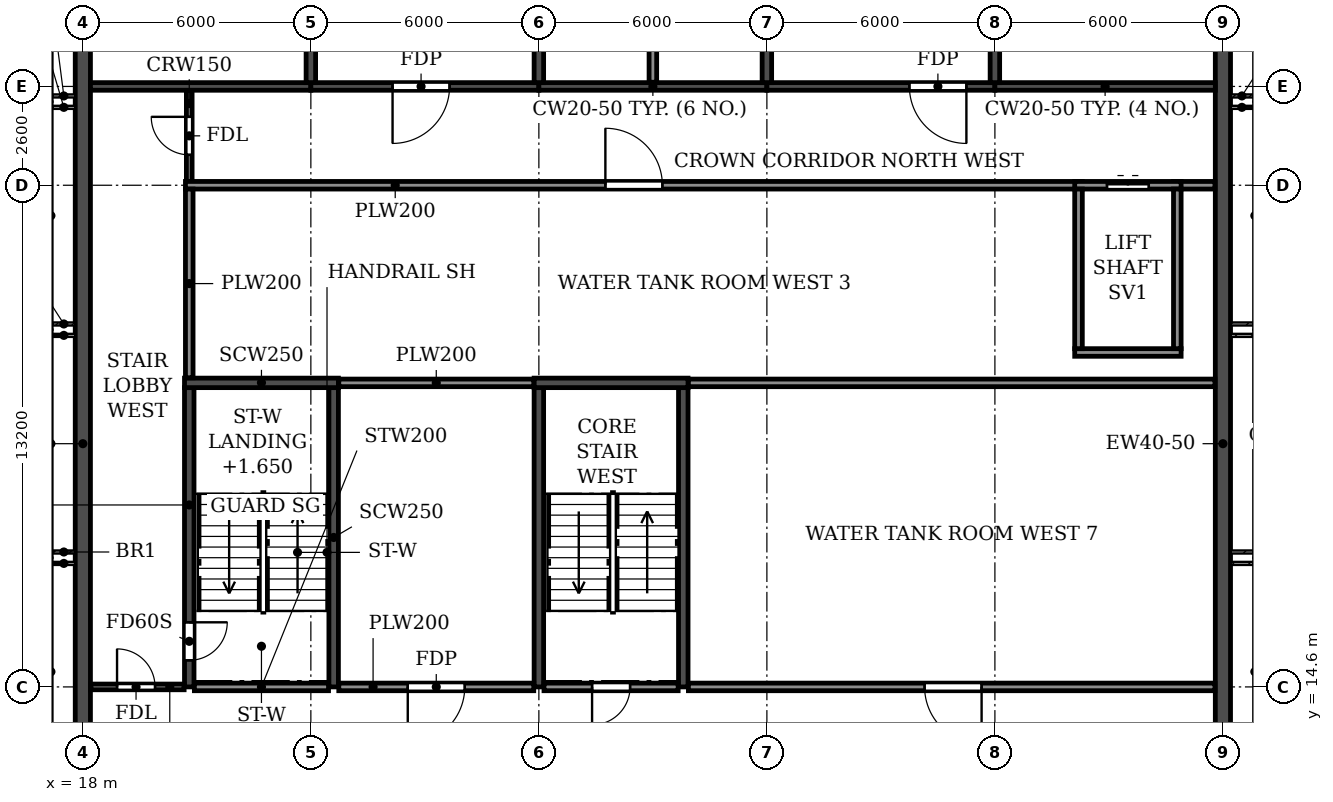
"""IFC4 building model, lengths in metres.
Left out: names, types, materials, properties, quantities, classifications, styles, units other than length and angle.
Written with IfcOpenShell. Run it as: python <this file> out.ifc"""

import sys

from ifc_helpers import new_model, si_unit, direction, frame, frame_2d, origin, place, context, subcontext, project, spatial, rectangle, extrude, element, fill, save


model = new_model("IFC4")
c1 = context("Model", 3, precision=1e-05, world=origin(), true_north=direction((0.0, 1.0)))
c2 = subcontext(c1, "Body", "Model", "MODEL_VIEW")
j1 = project(units=[si_unit("LENGTHUNIT", "METRE"), si_unit("PLANEANGLEUNIT", "RADIAN")], contexts=[c1])
p1 = place(None, origin())
s1 = spatial("IfcSite", under=j1, at=p1, CompositionType="ELEMENT")
p2 = place(p1, origin())
s2 = spatial("IfcBuilding", under=s1, at=p2, CompositionType="ELEMENT")
p3 = place(p2, frame((0.0, 0.0, 285.6)))
s3 = spatial("IfcBuildingStorey", under=s2, at=p3, CompositionType="ELEMENT", Elevation=285.6)
for number, where, z_axis, x_axis in (
    (1, (24.0, 30.5, 0.0), (0.0, 0.0, 1.0), (0.0, 1.0, 0.0)),
    (2, (30.0, 30.5, 0.0), (0.0, 0.0, 1.0), (0.0, 1.0, 0.0)),
    (3, (36.0, 30.5, 0.0), (0.0, 0.0, 1.0), (0.0, 1.0, 0.0)),
    (4, (42.0, 30.5, 0.0), (0.0, 0.0, 1.0), (0.0, 1.0, 0.0)),
):
    element("IfcWall", number, at=place(p3, frame(where, z_axis=z_axis, x_axis=x_axis)), inside=s3, PredefinedType="SHEAR", context=c2, shape_type="SweptSolid", body=[
        extrude(rectangle(XDim=10.5, YDim=0.25, at=frame_2d((5.25, 0.0))), origin(), (0.0, 0.0, 1.0), 3.05),
    ])
p4 = place(p3, frame((18.0, 4.683, 0.0), z_axis=(0.0, 0.0, 1.0), x_axis=(0.0, 1.0, 0.0)))
e5 = element("IfcWall", 5, at=p4, inside=s3, PredefinedType="SHEAR", context=c2, shape_type="SweptSolid", body=[
    extrude(rectangle(XDim=31.834, YDim=0.4, at=frame_2d((15.917, 0.0))), origin(), (0.0, 0.0, 1.0), 3.05),
])
p5 = place(p3, frame((48.0, 0.2, 0.0), z_axis=(0.0, 0.0, 1.0), x_axis=(0.0, 1.0, 0.0)))
e6 = element("IfcWall", 6, at=p5, inside=s3, PredefinedType="SHEAR", context=c2, shape_type="SweptSolid", body=[
    extrude(rectangle(XDim=40.8, YDim=0.4, at=frame_2d((20.4, 0.0))), origin(), (0.0, 0.0, 1.0), 3.05),
])
p6 = place(p3, frame((18.2, 30.4, 0.0), z_axis=(0.0, 0.0, 1.0), x_axis=(1.0, 0.0, 0.0)))
e7 = element("IfcWall", 7, at=p6, inside=s3, PredefinedType="SHEAR", context=c2, shape_type="SweptSolid", body=[
    extrude(rectangle(XDim=5.8, YDim=0.2, at=frame_2d((2.9, 0.0))), origin(), (0.0, 0.0, 1.0), 2.45),
])
p7 = place(p3, frame((24.0, 30.4, 0.0), z_axis=(0.0, 0.0, 1.0), x_axis=(1.0, 0.0, 0.0)))
e8 = element("IfcWall", 8, at=p7, inside=s3, PredefinedType="SHEAR", context=c2, shape_type="SweptSolid", body=[
    extrude(rectangle(XDim=6.0, YDim=0.2, at=frame_2d((3.0, 0.0))), origin(), (0.0, 0.0, 1.0), 2.45),
])
p8 = place(p7, frame((2.15, 0.0, 0.0)))
e9 = element("IfcOpeningElement", 9, at=p8, cuts=e8, PredefinedType="OPENING", context=c2, shape_type="SweptSolid", body=[
    extrude(rectangle(XDim=1.5, YDim=2.1, at=frame_2d((0.75, 1.05))), frame((0.0, 0.11, 0.0), z_axis=(0.0, -1.0, 0.0), x_axis=(1.0, 0.0, 0.0)), (0.0, 0.0, 1.0), 0.22),
])
p9 = place(p3, frame((30.0, 30.4, 0.0), z_axis=(0.0, 0.0, 1.0), x_axis=(1.0, 0.0, 0.0)))
e10 = element("IfcWall", 10, at=p9, inside=s3, PredefinedType="SHEAR", context=c2, shape_type="SweptSolid", body=[
    extrude(rectangle(XDim=6.0, YDim=0.2, at=frame_2d((3.0, 0.0))), origin(), (0.0, 0.0, 1.0), 2.45),
])
p10 = place(p3, frame((36.0, 30.4, 0.0), z_axis=(0.0, 0.0, 1.0), x_axis=(1.0, 0.0, 0.0)))
e11 = element("IfcWall", 11, at=p10, inside=s3, PredefinedType="SHEAR", context=c2, shape_type="SweptSolid", body=[
    extrude(rectangle(XDim=6.0, YDim=0.2, at=frame_2d((3.0, 0.0))), origin(), (0.0, 0.0, 1.0), 2.45),
])
p11 = place(p10, frame((3.75, 0.0, 0.0)))
e12 = element("IfcOpeningElement", 12, at=p11, cuts=e11, PredefinedType="OPENING", context=c2, shape_type="SweptSolid", body=[
    extrude(rectangle(XDim=1.5, YDim=2.1, at=frame_2d((0.75, 1.05))), frame((0.0, 0.11, 0.0), z_axis=(0.0, -1.0, 0.0), x_axis=(1.0, 0.0, 0.0)), (0.0, 0.0, 1.0), 0.22),
])
p12 = place(p3, frame((42.0, 30.4, 0.0), z_axis=(0.0, 0.0, 1.0), x_axis=(1.0, 0.0, 0.0)))
e13 = element("IfcWall", 13, at=p12, inside=s3, PredefinedType="SHEAR", context=c2, shape_type="SweptSolid", body=[
    extrude(rectangle(XDim=5.8, YDim=0.2, at=frame_2d((2.9, 0.0))), origin(), (0.0, 0.0, 1.0), 2.45),
])
p13 = place(p3, frame((20.8, 14.6, 0.0), z_axis=(0.0, 0.0, 1.0), x_axis=(0.0, 1.0, 0.0)))
e14 = element("IfcWall", 14, at=p13, inside=s3, PredefinedType="SOLIDWALL", context=c2, shape_type="SweptSolid", body=[
    extrude(rectangle(XDim=7.875, YDim=0.25, at=frame_2d((3.938, 0.0))), origin(), (0.0, 0.0, 1.0), 3.05),
])
p14 = place(p13, frame((0.7, 0.0, 0.0)))
e15 = element("IfcOpeningElement", 15, at=p14, cuts=e14, PredefinedType="OPENING", context=c2, shape_type="SweptSolid", body=[
    extrude(rectangle(XDim=1.0, YDim=2.1, at=frame_2d((0.5, 1.05))), frame((0.0, 0.135, 0.0), z_axis=(0.0, -1.0, 0.0), x_axis=(1.0, 0.0, 0.0)), (0.0, 0.0, 1.0), 0.27),
])
p15 = place(p3, frame((24.6, 14.6, 0.0), z_axis=(0.0, 0.0, 1.0), x_axis=(0.0, 1.0, 0.0)))
e16 = element("IfcWall", 16, at=p15, inside=s3, PredefinedType="SOLIDWALL", context=c2, shape_type="SweptSolid", body=[
    extrude(rectangle(XDim=7.875, YDim=0.25, at=frame_2d((3.938, 0.0))), origin(), (0.0, 0.0, 1.0), 3.05),
])
p16 = place(p3, frame((20.675, 22.6, 0.0), z_axis=(0.0, 0.0, 1.0), x_axis=(1.0, 0.0, 0.0)))
e17 = element("IfcWall", 17, at=p16, inside=s3, PredefinedType="SOLIDWALL", context=c2, shape_type="SweptSolid", body=[
    extrude(rectangle(XDim=4.05, YDim=0.25, at=frame_2d((2.025, 0.0))), origin(), (0.0, 0.0, 1.0), 3.05),
])
for number, where, z_axis, x_axis in (
    (18, (30.0, 14.6, 0.0), (0.0, 0.0, 1.0), (0.0, 1.0, 0.0)),
    (19, (33.8, 14.6, 0.0), (0.0, 0.0, 1.0), (0.0, 1.0, 0.0)),
):
    element("IfcWall", number, at=place(p3, frame(where, z_axis=z_axis, x_axis=x_axis)), inside=s3, PredefinedType="SOLIDWALL", context=c2, shape_type="SweptSolid", body=[
        extrude(rectangle(XDim=7.875, YDim=0.25, at=frame_2d((3.938, 0.0))), origin(), (0.0, 0.0, 1.0), 3.05),
    ])
p17 = place(p3, frame((29.875, 22.6, 0.0), z_axis=(0.0, 0.0, 1.0), x_axis=(1.0, 0.0, 0.0)))
e20 = element("IfcWall", 20, at=p17, inside=s3, PredefinedType="SOLIDWALL", context=c2, shape_type="SweptSolid", body=[
    extrude(rectangle(XDim=4.05, YDim=0.25, at=frame_2d((2.025, 0.0))), origin(), (0.0, 0.0, 1.0), 3.05),
])
p18 = place(p3, frame((18.21, 14.6, 0.0), z_axis=(0.0, 0.0, 1.0), x_axis=(1.0, 0.0, 0.0)))
e21 = element("IfcWall", 21, at=p18, inside=s3, PredefinedType="PARTITIONING", context=c2, shape_type="SweptSolid", body=[
    extrude(rectangle(XDim=2.455, YDim=0.15, at=frame_2d((1.228, 0.0))), origin(), (0.0, 0.0, 1.0), 3.05),
])
p19 = place(p18, frame((0.69, 0.0, 0.0)))
e22 = element("IfcOpeningElement", 22, at=p19, cuts=e21, PredefinedType="OPENING", context=c2, shape_type="SweptSolid", body=[
    extrude(rectangle(XDim=1.0, YDim=2.1, at=frame_2d((0.5, 1.05))), frame((0.0, 0.085, 0.0), z_axis=(0.0, -1.0, 0.0), x_axis=(1.0, 0.0, 0.0)), (0.0, 0.0, 1.0), 0.17),
])
p20 = place(p3, frame((20.8, 27.9, 0.0), z_axis=(0.0, 0.0, 1.0), x_axis=(0.0, 1.0, 0.0)))
e23 = element("IfcWall", 23, at=p20, inside=s3, PredefinedType="PARTITIONING", context=c2, shape_type="SweptSolid", body=[
    extrude(rectangle(XDim=2.39, YDim=0.15, at=frame_2d((1.195, 0.0))), origin(), (0.0, 0.0, 1.0), 3.05),
])
p21 = place(p20, frame((0.7, 0.0, 0.0)))
e24 = element("IfcOpeningElement", 24, at=p21, cuts=e23, PredefinedType="OPENING", context=c2, shape_type="SweptSolid", body=[
    extrude(rectangle(XDim=1.0, YDim=2.1, at=frame_2d((0.5, 1.05))), frame((0.0, 0.085, 0.0), z_axis=(0.0, -1.0, 0.0), x_axis=(1.0, 0.0, 0.0)), (0.0, 0.0, 1.0), 0.17),
])
p22 = place(p3, frame((24.735, 14.6, 0.0), z_axis=(0.0, 0.0, 1.0), x_axis=(1.0, 0.0, 0.0)))
e25 = element("IfcWall", 25, at=p22, inside=s3, PredefinedType="PARTITIONING", context=c2, shape_type="SweptSolid", body=[
    extrude(rectangle(XDim=5.13, YDim=0.2, at=frame_2d((2.565, 0.0))), origin(), (0.0, 0.0, 1.0), 3.05),
])
p23 = place(p22, frame((1.815, 0.0, 0.0)))
e26 = element("IfcOpeningElement", 26, at=p23, cuts=e25, PredefinedType="OPENING", context=c2, shape_type="SweptSolid", body=[
    extrude(rectangle(XDim=1.5, YDim=2.1, at=frame_2d((0.75, 1.05))), frame((0.0, 0.11, 0.0), z_axis=(0.0, -1.0, 0.0), x_axis=(1.0, 0.0, 0.0)), (0.0, 0.0, 1.0), 0.22),
])
p24 = place(p3, frame((33.935, 14.6, 0.0), z_axis=(0.0, 0.0, 1.0), x_axis=(1.0, 0.0, 0.0)))
e27 = element("IfcWall", 27, at=p24, inside=s3, PredefinedType="PARTITIONING", context=c2, shape_type="SweptSolid", body=[
    extrude(rectangle(XDim=13.855, YDim=0.2, at=frame_2d((6.927, 0.0))), origin(), (0.0, 0.0, 1.0), 3.05),
])
p25 = place(p24, frame((6.215, 0.0, 0.0)))
e28 = element("IfcOpeningElement", 28, at=p25, cuts=e27, PredefinedType="OPENING", context=c2, shape_type="SweptSolid", body=[
    extrude(rectangle(XDim=1.5, YDim=2.1, at=frame_2d((0.75, 1.05))), frame((0.0, 0.11, 0.0), z_axis=(0.0, -1.0, 0.0), x_axis=(1.0, 0.0, 0.0)), (0.0, 0.0, 1.0), 0.22),
])
p26 = place(p3, frame((24.735, 22.6, 0.0), z_axis=(0.0, 0.0, 1.0), x_axis=(1.0, 0.0, 0.0)))
e29 = element("IfcWall", 29, at=p26, inside=s3, PredefinedType="PARTITIONING", context=c2, shape_type="SweptSolid", body=[
    extrude(rectangle(XDim=5.13, YDim=0.2, at=frame_2d((2.565, 0.0))), origin(), (0.0, 0.0, 1.0), 3.05),
])
p27 = place(p3, frame((33.935, 22.6, 0.0), z_axis=(0.0, 0.0, 1.0), x_axis=(1.0, 0.0, 0.0)))
e30 = element("IfcWall", 30, at=p27, inside=s3, PredefinedType="PARTITIONING", context=c2, shape_type="SweptSolid", body=[
    extrude(rectangle(XDim=13.855, YDim=0.2, at=frame_2d((6.927, 0.0))), origin(), (0.0, 0.0, 1.0), 3.05),
])
p28 = place(p3, frame((20.7, 27.8, 0.0), z_axis=(0.0, 0.0, 1.0), x_axis=(1.0, 0.0, 0.0)))
e31 = element("IfcWall", 31, at=p28, inside=s3, PredefinedType="PARTITIONING", context=c2, shape_type="SweptSolid", body=[
    extrude(rectangle(XDim=23.6, YDim=0.2, at=frame_2d((11.8, 0.0))), origin(), (0.0, 0.0, 1.0), 3.05),
])
p29 = place(p28, frame((11.05, 0.0, 0.0)))
e32 = element("IfcOpeningElement", 32, at=p29, cuts=e31, PredefinedType="OPENING", context=c2, shape_type="SweptSolid", body=[
    extrude(rectangle(XDim=1.5, YDim=2.1, at=frame_2d((0.75, 1.05))), frame((0.0, 0.11, 0.0), z_axis=(0.0, -1.0, 0.0), x_axis=(1.0, 0.0, 0.0)), (0.0, 0.0, 1.0), 0.22),
])
p30 = place(p3, frame((46.7, 27.8, 0.0), z_axis=(0.0, 0.0, 1.0), x_axis=(1.0, 0.0, 0.0)))
e33 = element("IfcWall", 33, at=p30, inside=s3, PredefinedType="PARTITIONING", context=c2, shape_type="SweptSolid", body=[
    extrude(rectangle(XDim=1.09, YDim=0.2, at=frame_2d((0.545, 0.0))), origin(), (0.0, 0.0, 1.0), 3.05),
])
p31 = place(p3, frame((20.8, 22.735, 0.0), z_axis=(0.0, 0.0, 1.0), x_axis=(0.0, 1.0, 0.0)))
e34 = element("IfcWall", 34, at=p31, inside=s3, PredefinedType="PARTITIONING", context=c2, shape_type="SweptSolid", body=[
    extrude(rectangle(XDim=4.965, YDim=0.2, at=frame_2d((2.482, 0.0))), origin(), (0.0, 0.0, 1.0), 3.05),
])
p32 = place(p3, frame((33.0, 30.51, 0.0), z_axis=(0.0, 0.0, 1.0), x_axis=(0.0, 1.0, 0.0)))
e35 = element("IfcWall", 35, at=p32, inside=s3, PredefinedType="PARTITIONING", context=c2, shape_type="SweptSolid", body=[
    extrude(rectangle(XDim=10.63, YDim=0.2, at=frame_2d((5.315, 0.0))), origin(), (0.0, 0.0, 1.0), 3.05),
])
p33 = place(p3, frame((44.1, 23.4, 0.0), z_axis=(0.0, 0.0, 1.0), x_axis=(1.0, 0.0, 0.0)))
e36 = element("IfcWall", 36, at=p33, inside=s3, PredefinedType="PARTITIONING", context=c2, shape_type="SweptSolid", body=[
    extrude(rectangle(XDim=2.8, YDim=0.2, at=frame_2d((1.4, 0.0))), origin(), (0.0, 0.0, 1.0), 3.05),
])
p34 = place(p3, frame((44.1, 27.8, 0.0), z_axis=(0.0, 0.0, 1.0), x_axis=(1.0, 0.0, 0.0)))
e37 = element("IfcWall", 37, at=p34, inside=s3, PredefinedType="PARTITIONING", context=c2, shape_type="SweptSolid", body=[
    extrude(rectangle(XDim=2.8, YDim=0.2, at=frame_2d((1.4, 0.0))), origin(), (0.0, 0.0, 1.0), 3.05),
])
p35 = place(p34, frame((0.85, 0.0, 0.0)))
e38 = element("IfcOpeningElement", 38, at=p35, cuts=e37, PredefinedType="OPENING", context=c2, shape_type="SweptSolid", body=[
    extrude(rectangle(XDim=1.1, YDim=2.1, at=frame_2d((0.55, 1.05))), frame((0.0, 0.11, 0.0), z_axis=(0.0, -1.0, 0.0), x_axis=(1.0, 0.0, 0.0)), (0.0, 0.0, 1.0), 0.22),
])
for number, where, z_axis, x_axis in (
    (39, (44.2, 23.5, 0.0), (0.0, 0.0, 1.0), (0.0, 1.0, 0.0)),
    (40, (46.8, 23.5, 0.0), (0.0, 0.0, 1.0), (0.0, 1.0, 0.0)),
):
    element("IfcWall", number, at=place(p3, frame(where, z_axis=z_axis, x_axis=x_axis)), inside=s3, PredefinedType="PARTITIONING", context=c2, shape_type="SweptSolid", body=[
        extrude(rectangle(XDim=4.2, YDim=0.2, at=frame_2d((2.1, 0.0))), origin(), (0.0, 0.0, 1.0), 3.05),
    ])
p36 = place(p3, frame((20.935, 14.6, 0.0), z_axis=(0.0, 0.0, 1.0), x_axis=(1.0, 0.0, 0.0)))
e41 = element("IfcWall", 41, at=p36, inside=s3, PredefinedType="PARTITIONING", context=c2, shape_type="SweptSolid", body=[
    extrude(rectangle(XDim=3.53, YDim=0.2, at=frame_2d((1.765, 0.0))), origin(), (0.0, 0.0, 1.0), 3.05),
])
p37 = place(p3, frame((30.135, 14.6, 0.0), z_axis=(0.0, 0.0, 1.0), x_axis=(1.0, 0.0, 0.0)))
e42 = element("IfcWall", 42, at=p37, inside=s3, PredefinedType="PARTITIONING", context=c2, shape_type="SweptSolid", body=[
    extrude(rectangle(XDim=3.53, YDim=0.2, at=frame_2d((1.765, 0.0))), origin(), (0.0, 0.0, 1.0), 3.05),
])
p38 = place(p37, frame((1.265, 0.0, 0.0)))
e43 = element("IfcOpeningElement", 43, at=p38, cuts=e42, PredefinedType="OPENING", context=c2, shape_type="SweptSolid", body=[
    extrude(rectangle(XDim=1.0, YDim=2.1, at=frame_2d((0.5, 1.05))), frame((0.0, 0.11, 0.0), z_axis=(0.0, -1.0, 0.0), x_axis=(1.0, 0.0, 0.0)), (0.0, 0.0, 1.0), 0.22),
])
p39 = place(p8, frame((1.5, 0.0, 0.0), z_axis=(0.0, 0.0, 1.0), x_axis=(-1.0, 0.0, 0.0)))
e44 = element("IfcDoor", 44, at=p39, inside=s3, OperationType="DOUBLE_DOOR_SINGLE_SWING", PredefinedType="DOOR", context=c2, shape_type="SweptSolid", body=[
    extrude(rectangle(XDim=1.5, YDim=2.1, at=frame_2d((0.75, 1.05))), frame((0.0, 0.025, 0.0), z_axis=(0.0, -1.0, 0.0), x_axis=(1.0, 0.0, 0.0)), (0.0, 0.0, 1.0), 0.05),
])
fill(e9, e44)
p40 = place(p29, origin())
e45 = element("IfcDoor", 45, at=p40, inside=s3, OperationType="DOUBLE_DOOR_SINGLE_SWING", PredefinedType="DOOR", context=c2, shape_type="SweptSolid", body=[
    extrude(rectangle(XDim=1.5, YDim=2.1, at=frame_2d((0.75, 1.05))), frame((0.0, 0.025, 0.0), z_axis=(0.0, -1.0, 0.0), x_axis=(1.0, 0.0, 0.0)), (0.0, 0.0, 1.0), 0.05),
])
fill(e32, e45)
p41 = place(p11, frame((1.5, 0.0, 0.0), z_axis=(0.0, 0.0, 1.0), x_axis=(-1.0, 0.0, 0.0)))
e46 = element("IfcDoor", 46, at=p41, inside=s3, OperationType="DOUBLE_DOOR_SINGLE_SWING", PredefinedType="DOOR", context=c2, shape_type="SweptSolid", body=[
    extrude(rectangle(XDim=1.5, YDim=2.1, at=frame_2d((0.75, 1.05))), frame((0.0, 0.025, 0.0), z_axis=(0.0, -1.0, 0.0), x_axis=(1.0, 0.0, 0.0)), (0.0, 0.0, 1.0), 0.05),
])
fill(e12, e46)
p42 = place(p35, origin())
e47 = element("IfcDoor", 47, at=p42, inside=s3, OperationType="DOUBLE_DOOR_SLIDING", PredefinedType="DOOR", context=c2, shape_type="SweptSolid", body=[
    extrude(rectangle(XDim=1.1, YDim=2.1, at=frame_2d((0.55, 1.05))), frame((0.0, 0.025, 0.0), z_axis=(0.0, -1.0, 0.0), x_axis=(1.0, 0.0, 0.0)), (0.0, 0.0, 1.0), 0.05),
])
fill(e38, e47)
p43 = place(p23, frame((1.5, 0.0, 0.0), z_axis=(0.0, 0.0, 1.0), x_axis=(-1.0, 0.0, 0.0)))
e48 = element("IfcDoor", 48, at=p43, inside=s3, OperationType="DOUBLE_DOOR_SINGLE_SWING", PredefinedType="DOOR", context=c2, shape_type="SweptSolid", body=[
    extrude(rectangle(XDim=1.5, YDim=2.1, at=frame_2d((0.75, 1.05))), frame((0.0, 0.025, 0.0), z_axis=(0.0, -1.0, 0.0), x_axis=(1.0, 0.0, 0.0)), (0.0, 0.0, 1.0), 0.05),
])
fill(e26, e48)
p44 = place(p25, frame((1.5, 0.0, 0.0), z_axis=(0.0, 0.0, 1.0), x_axis=(-1.0, 0.0, 0.0)))
e49 = element("IfcDoor", 49, at=p44, inside=s3, OperationType="DOUBLE_DOOR_SINGLE_SWING", PredefinedType="DOOR", context=c2, shape_type="SweptSolid", body=[
    extrude(rectangle(XDim=1.5, YDim=2.1, at=frame_2d((0.75, 1.05))), frame((0.0, 0.025, 0.0), z_axis=(0.0, -1.0, 0.0), x_axis=(1.0, 0.0, 0.0)), (0.0, 0.0, 1.0), 0.05),
])
fill(e28, e49)
p45 = place(p19, origin())
e50 = element("IfcDoor", 50, at=p45, inside=s3, OperationType="SINGLE_SWING_LEFT", PredefinedType="DOOR", context=c2, shape_type="SweptSolid", body=[
    extrude(rectangle(XDim=1.0, YDim=2.1, at=frame_2d((0.5, 1.05))), frame((0.0, 0.025, 0.0), z_axis=(0.0, -1.0, 0.0), x_axis=(1.0, 0.0, 0.0)), (0.0, 0.0, 1.0), 0.05),
])
fill(e22, e50)
p46 = place(p14, frame((1.0, 0.0, 0.0), z_axis=(0.0, 0.0, 1.0), x_axis=(-1.0, 0.0, 0.0)))
e51 = element("IfcDoor", 51, at=p46, inside=s3, OperationType="SINGLE_SWING_LEFT", PredefinedType="DOOR", context=c2, shape_type="SweptSolid", body=[
    extrude(rectangle(XDim=1.0, YDim=2.1, at=frame_2d((0.5, 1.05))), frame((0.0, 0.025, 0.0), z_axis=(0.0, -1.0, 0.0), x_axis=(1.0, 0.0, 0.0)), (0.0, 0.0, 1.0), 0.05),
])
fill(e15, e51)
p47 = place(p21, origin())
e52 = element("IfcDoor", 52, at=p47, inside=s3, OperationType="SINGLE_SWING_RIGHT", PredefinedType="DOOR", context=c2, shape_type="SweptSolid", body=[
    extrude(rectangle(XDim=1.0, YDim=2.1, at=frame_2d((0.5, 1.05))), frame((0.0, 0.025, 0.0), z_axis=(0.0, -1.0, 0.0), x_axis=(1.0, 0.0, 0.0)), (0.0, 0.0, 1.0), 0.05),
])
fill(e24, e52)
p48 = place(p38, frame((1.0, 0.0, 0.0), z_axis=(0.0, 0.0, 1.0), x_axis=(-1.0, 0.0, 0.0)))
e53 = element("IfcDoor", 53, at=p48, inside=s3, OperationType="SINGLE_SWING_RIGHT", PredefinedType="DOOR", context=c2, shape_type="SweptSolid", body=[
    extrude(rectangle(XDim=1.0, YDim=2.1, at=frame_2d((0.5, 1.05))), frame((0.0, 0.025, 0.0), z_axis=(0.0, -1.0, 0.0), x_axis=(1.0, 0.0, 0.0)), (0.0, 0.0, 1.0), 0.05),
])
fill(e43, e53)
save(model, sys.argv[1])
